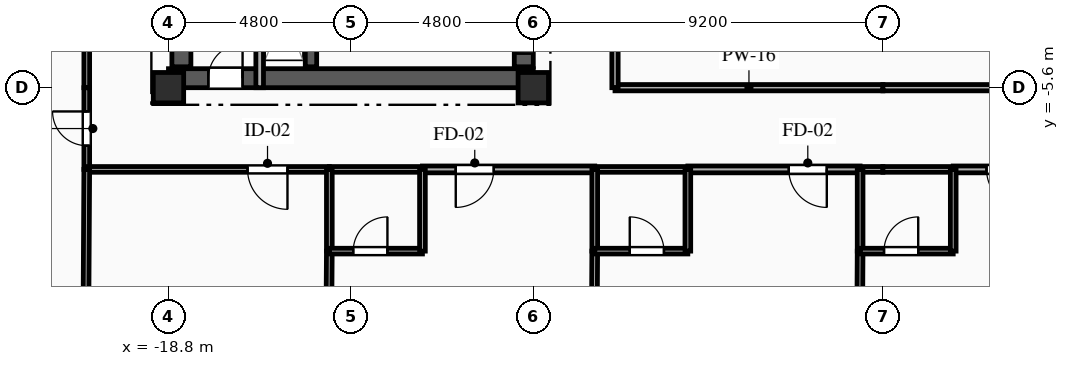
"""IFC4 building model, lengths in metres.
Left out: names, types, materials, properties, quantities, classifications, styles, units other than length and angle.
Written with IfcOpenShell. Run it as: python <this file> out.ifc"""

import sys

from ifc_helpers import new_model, si_unit, direction, frame, frame_2d, origin, origin_2d, place, context, subcontext, project, spatial, rectangle, extrude, element, fill, save


model = new_model("IFC4")
c1 = context("Model", 3, precision=1e-05, world=origin(), true_north=direction((0.0, 1.0)))
c2 = subcontext(c1, "Body", "Model", "MODEL_VIEW")
j1 = project(units=[si_unit("LENGTHUNIT", "METRE"), si_unit("PLANEANGLEUNIT", "RADIAN")], contexts=[c1])
p1 = place(None, origin())
s1 = spatial("IfcSite", under=j1, at=p1, CompositionType="ELEMENT")
p2 = place(p1, origin())
s2 = spatial("IfcBuilding", under=s1, at=p2, CompositionType="ELEMENT")
p3 = place(p2, frame((0.0, 0.0, 206.45)))
s3 = spatial("IfcBuildingStorey", under=s2, at=p3, CompositionType="ELEMENT", Elevation=206.45)
for number, where, z_axis, x_axis in (
    (1, (-18.8, -5.6, 0.0), (0.0, 0.0, 1.0), (1.0, 0.0, 0.0)),
    (2, (-9.2, -5.6, 0.0), (0.0, 0.0, 1.0), (1.0, 0.0, 0.0)),
):
    element("IfcColumn", number, at=place(p3, frame(where, z_axis=z_axis, x_axis=x_axis)), inside=s3, PredefinedType="COLUMN", context=c2, shape_type="SweptSolid", body=[
        extrude(rectangle(XDim=0.8, YDim=0.8, at=origin_2d()), origin(), (0.0, 0.0, 1.0), 3.35),
    ])
p4 = place(p3, frame((-18.8, -5.35, 0.0), z_axis=(0.0, 0.0, 1.0), x_axis=(1.0, 0.0, 0.0)))
e3 = element("IfcWall", 3, at=p4, inside=s3, PredefinedType="SHEAR", context=c2, shape_type="SweptSolid", body=[
    extrude(rectangle(XDim=9.6, YDim=0.5, at=frame_2d((4.8, 0.0))), origin(), (0.0, 0.0, 1.0), 3.04),
])
p5 = place(p4, frame((1.05, 0.0, 0.0)))
e4 = element("IfcOpeningElement", 4, at=p5, cuts=e3, PredefinedType="OPENING", context=c2, shape_type="SweptSolid", body=[
    extrude(rectangle(XDim=0.9, YDim=2.1, at=frame_2d((0.45, 1.05))), frame((0.0, 0.26, 0.0), z_axis=(0.0, -1.0, 0.0), x_axis=(1.0, 0.0, 0.0)), (0.0, 0.0, 1.0), 0.52),
])
p6 = place(p3, frame((-18.46, -5.05, 0.0), z_axis=(0.0, 0.0, 1.0), x_axis=(0.0, 1.0, 0.0)))
e5 = element("IfcWall", 5, at=p6, inside=s3, PredefinedType="SHEAR", context=c2, shape_type="SweptSolid", body=[
    extrude(rectangle(XDim=10.1, YDim=0.5, at=frame_2d((5.05, 0.0))), origin(), (0.0, 0.0, 1.0), 3.04),
])
p7 = place(p3, frame((-9.45, -5.05, 0.0), z_axis=(0.0, 0.0, 1.0), x_axis=(0.0, 1.0, 0.0)))
e6 = element("IfcWall", 6, at=p7, inside=s3, PredefinedType="SHEAR", context=c2, shape_type="SweptSolid", body=[
    extrude(rectangle(XDim=10.1, YDim=0.5, at=frame_2d((5.05, 0.0))), origin(), (0.0, 0.0, 1.0), 3.04),
])
p8 = place(p7, frame((7.175, 0.0, 0.0)))
e7 = element("IfcOpeningElement", 7, at=p8, cuts=e6, PredefinedType="OPENING", context=c2, shape_type="SweptSolid", body=[
    extrude(rectangle(XDim=0.9, YDim=2.1, at=frame_2d((0.45, 1.05))), frame((0.0, 0.26, 0.0), z_axis=(0.0, -1.0, 0.0), x_axis=(1.0, 0.0, 0.0)), (0.0, 0.0, 1.0), 0.52),
])
p9 = place(p7, frame((2.4, 0.0, 0.0)))
e8 = element("IfcOpeningElement", 8, at=p9, cuts=e6, PredefinedType="OPENING", context=c2, shape_type="SweptSolid", body=[
    extrude(rectangle(XDim=1.2, YDim=2.15, at=frame_2d((0.6, 1.075))), frame((0.0, 0.26, 0.0), z_axis=(0.0, -1.0, 0.0), x_axis=(1.0, 0.0, 0.0)), (0.0, 0.0, 1.0), 0.52),
])
p10 = place(p7, frame((0.35, 0.0, 0.0)))
e9 = element("IfcOpeningElement", 9, at=p10, cuts=e6, PredefinedType="OPENING", context=c2, shape_type="SweptSolid", body=[
    extrude(rectangle(XDim=0.9, YDim=2.1, at=frame_2d((0.45, 1.05))), frame((0.0, 0.26, 0.0), z_axis=(0.0, -1.0, 0.0), x_axis=(1.0, 0.0, 0.0)), (0.0, 0.0, 1.0), 0.52),
])
p11 = place(p7, frame((5.0, 0.0, 0.0)))
e10 = element("IfcOpeningElement", 10, at=p11, cuts=e6, PredefinedType="OPENING", context=c2, shape_type="SweptSolid", body=[
    extrude(rectangle(XDim=0.9, YDim=2.1, at=frame_2d((0.45, 1.05))), frame((0.0, 0.26, 0.0), z_axis=(0.0, -1.0, 0.0), x_axis=(1.0, 0.0, 0.0)), (0.0, 0.0, 1.0), 0.52),
])
p12 = place(p3, frame((-15.05, -5.05, 0.0), z_axis=(0.0, 0.0, 1.0), x_axis=(0.0, 1.0, 0.0)))
e11 = element("IfcWall", 11, at=p12, inside=s3, PredefinedType="SHEAR", context=c2, shape_type="SweptSolid", body=[
    extrude(rectangle(XDim=10.1, YDim=0.3, at=frame_2d((5.05, 0.0))), origin(), (0.0, 0.0, 1.0), 3.04),
])
p13 = place(p3, frame((-16.4, -5.6, 0.0), z_axis=(0.0, 0.0, 1.0), x_axis=(0.0, 1.0, 0.0)))
e12 = element("IfcWall", 12, at=p13, inside=s3, PredefinedType="PARTITIONING", context=c2, shape_type="SweptSolid", body=[
    extrude(rectangle(XDim=3.49, YDim=0.2, at=frame_2d((1.745, 0.0))), origin(), (0.0, 0.0, 1.0), 3.04),
])
p14 = place(p3, frame((-20.95, -7.75, 0.0), z_axis=(0.0, 0.0, 1.0), x_axis=(0.0, 1.0, 0.0)))
e13 = element("IfcWall", 13, at=p14, inside=s3, PredefinedType="PARTITIONING", context=c2, shape_type="SweptSolid", body=[
    extrude(rectangle(XDim=2.15, YDim=0.15, at=frame_2d((1.075, 0.0))), origin(), (0.0, 0.0, 1.0), 3.04),
])
p15 = place(p14, frame((0.625, 0.0, 0.0)))
e14 = element("IfcOpeningElement", 14, at=p15, cuts=e13, PredefinedType="OPENING", context=c2, shape_type="SweptSolid", body=[
    extrude(rectangle(XDim=0.9, YDim=2.1, at=frame_2d((0.45, 1.05))), frame((0.0, 0.085, 0.0), z_axis=(0.0, -1.0, 0.0), x_axis=(1.0, 0.0, 0.0)), (0.0, 0.0, 1.0), 0.17),
])
p16 = place(p3, frame((-14.567, -7.75, 0.0), z_axis=(0.0, 0.0, 1.0), x_axis=(-1.0, 0.0, 0.0)))
e15 = element("IfcWall", 15, at=p16, inside=s3, PredefinedType="PARTITIONING", context=c2, shape_type="SweptSolid", body=[
    extrude(rectangle(XDim=6.383, YDim=0.15, at=frame_2d((3.191, 0.0))), origin(), (0.0, 0.0, 1.0), 3.04),
])
p17 = place(p16, frame((1.102, 0.0, 0.0)))
e16 = element("IfcOpeningElement", 16, at=p17, cuts=e15, PredefinedType="OPENING", context=c2, shape_type="SweptSolid", body=[
    extrude(rectangle(XDim=1.05, YDim=2.15, at=frame_2d((0.525, 1.075))), frame((0.0, 0.085, 0.0), z_axis=(0.0, -1.0, 0.0), x_axis=(1.0, 0.0, 0.0)), (0.0, 0.0, 1.0), 0.17),
])
p18 = place(p3, frame((-7.583, -7.75, 0.0), z_axis=(0.0, 0.0, 1.0), x_axis=(-1.0, 0.0, 0.0)))
e17 = element("IfcWall", 17, at=p18, inside=s3, PredefinedType="PARTITIONING", context=c2, shape_type="SweptSolid", body=[
    extrude(rectangle(XDim=4.534, YDim=0.18, at=frame_2d((2.267, 0.0))), origin(), (0.0, 0.0, 1.0), 3.04),
])
p19 = place(p18, frame((2.657, 0.0, 0.0)))
e18 = element("IfcOpeningElement", 18, at=p19, cuts=e17, PredefinedType="OPENING", context=c2, shape_type="SweptSolid", body=[
    extrude(rectangle(XDim=1.0, YDim=2.15, at=frame_2d((0.5, 1.075))), frame((0.0, 0.1, 0.0), z_axis=(0.0, -1.0, 0.0), x_axis=(1.0, 0.0, 0.0)), (0.0, 0.0, 1.0), 0.2),
])
p20 = place(p3, frame((-12.117, -7.75, 0.0), z_axis=(0.0, 0.0, 1.0), x_axis=(-1.0, 0.0, 0.0)))
e19 = element("IfcWall", 19, at=p20, inside=s3, PredefinedType="PLUMBINGWALL", context=c2, shape_type="SweptSolid", body=[
    extrude(rectangle(XDim=2.45, YDim=0.15, at=frame_2d((1.225, 0.0))), origin(), (0.0, 0.0, 1.0), 3.04),
])
p21 = place(p3, frame((-0.6, -7.75, 0.0), z_axis=(0.0, 0.0, 1.0), x_axis=(-1.0, 0.0, 0.0)))
e20 = element("IfcWall", 20, at=p21, inside=s3, PredefinedType="PARTITIONING", context=c2, shape_type="SweptSolid", body=[
    extrude(rectangle(XDim=4.533, YDim=0.18, at=frame_2d((2.267, 0.0))), origin(), (0.0, 0.0, 1.0), 3.04),
])
p22 = place(p21, frame((0.877, 0.0, 0.0)))
e21 = element("IfcOpeningElement", 21, at=p22, cuts=e20, PredefinedType="OPENING", context=c2, shape_type="SweptSolid", body=[
    extrude(rectangle(XDim=1.0, YDim=2.15, at=frame_2d((0.5, 1.075))), frame((0.0, 0.1, 0.0), z_axis=(0.0, -1.0, 0.0), x_axis=(1.0, 0.0, 0.0)), (0.0, 0.0, 1.0), 0.2),
])
p23 = place(p3, frame((-5.133, -7.75, 0.0), z_axis=(0.0, 0.0, 1.0), x_axis=(-1.0, 0.0, 0.0)))
e22 = element("IfcWall", 22, at=p23, inside=s3, PredefinedType="PLUMBINGWALL", context=c2, shape_type="SweptSolid", body=[
    extrude(rectangle(XDim=2.45, YDim=0.15, at=frame_2d((1.225, 0.0))), origin(), (0.0, 0.0, 1.0), 3.04),
])
p24 = place(p3, frame((0.0, -7.75, 0.0), z_axis=(0.0, 0.0, 1.0), x_axis=(-1.0, 0.0, 0.0)))
e23 = element("IfcWall", 23, at=p24, inside=s3, PredefinedType="PLUMBINGWALL", context=c2, shape_type="SweptSolid", body=[
    extrude(rectangle(XDim=0.6, YDim=0.15, at=frame_2d((0.3, 0.0))), origin(), (0.0, 0.0, 1.0), 3.04),
])
p25 = place(p3, frame((-7.05, -5.6, 0.0), z_axis=(0.0, 0.0, 1.0), x_axis=(1.0, 0.0, 0.0)))
e24 = element("IfcWall", 24, at=p25, inside=s3, PredefinedType="PARTITIONING", context=c2, shape_type="SweptSolid", body=[
    extrude(rectangle(XDim=7.05, YDim=0.165, at=frame_2d((3.525, 0.0))), origin(), (0.0, 0.0, 1.0), 2.525),
])
p26 = place(p3, frame((6.383, -7.75, 0.0), z_axis=(0.0, 0.0, 1.0), x_axis=(-1.0, 0.0, 0.0)))
e25 = element("IfcWall", 25, at=p26, inside=s3, PredefinedType="PARTITIONING", context=c2, shape_type="SweptSolid", body=[
    extrude(rectangle(XDim=4.533, YDim=0.18, at=frame_2d((2.267, 0.0))), origin(), (0.0, 0.0, 1.0), 3.04),
])
p27 = place(p26, frame((2.656, 0.0, 0.0)))
e26 = element("IfcOpeningElement", 26, at=p27, cuts=e25, PredefinedType="OPENING", context=c2, shape_type="SweptSolid", body=[
    extrude(rectangle(XDim=1.0, YDim=2.15, at=frame_2d((0.5, 1.075))), frame((0.0, 0.1, 0.0), z_axis=(0.0, -1.0, 0.0), x_axis=(1.0, 0.0, 0.0)), (0.0, 0.0, 1.0), 0.2),
])
p28 = place(p3, frame((1.85, -7.75, 0.0), z_axis=(0.0, 0.0, 1.0), x_axis=(-1.0, 0.0, 0.0)))
e27 = element("IfcWall", 27, at=p28, inside=s3, PredefinedType="PLUMBINGWALL", context=c2, shape_type="SweptSolid", body=[
    extrude(rectangle(XDim=1.85, YDim=0.15, at=frame_2d((0.925, 0.0))), origin(), (0.0, 0.0, 1.0), 3.04),
])
p29 = place(p3, frame((0.0, -5.6, 0.0), z_axis=(0.0, 0.0, 1.0), x_axis=(1.0, 0.0, 0.0)))
e28 = element("IfcWall", 28, at=p29, inside=s3, PredefinedType="PARTITIONING", context=c2, shape_type="SweptSolid", body=[
    extrude(rectangle(XDim=7.05, YDim=0.165, at=frame_2d((3.525, 0.0))), origin(), (0.0, 0.0, 1.0), 2.525),
])
p30 = place(p3, frame((-20.95, -5.6, 0.0), z_axis=(0.0, 0.0, 1.0), x_axis=(0.0, 1.0, 0.0)))
e29 = element("IfcWall", 29, at=p30, inside=s3, PredefinedType="PARTITIONING", context=c2, shape_type="SweptSolid", body=[
    extrude(rectangle(XDim=2.144, YDim=0.15, at=frame_2d((1.072, 0.0))), origin(), (0.0, 0.0, 1.0), 3.04),
])
p31 = place(p3, frame((-7.05, -2.95, 0.0), z_axis=(0.0, 0.0, 1.0), x_axis=(0.0, -1.0, 0.0)))
e30 = element("IfcWall", 30, at=p31, inside=s3, PredefinedType="PARTITIONING", context=c2, shape_type="SweptSolid", body=[
    extrude(rectangle(XDim=2.65, YDim=0.165, at=frame_2d((1.325, 0.0))), origin(), (0.0, 0.0, 1.0), 3.04),
])
p32 = place(p3, frame((-20.95, -7.75, 0.0), z_axis=(0.0, 0.0, 1.0), x_axis=(-0.005804668564, -0.99998315277, 0.0)))
e31 = element("IfcWall", 31, at=p32, inside=s3, PredefinedType="PARTITIONING", context=c2, shape_type="SweptSolid", body=[
    extrude(rectangle(XDim=7.571, YDim=0.15, at=frame_2d((3.785, 0.0))), origin(), (0.0, 0.0, 1.0), 3.04),
])
p33 = place(p3, frame((-14.567, -9.9, 0.0), z_axis=(0.0, 0.0, 1.0), x_axis=(-0.007213951996, -0.99997397911, 0.0)))
e32 = element("IfcWall", 32, at=p33, inside=s3, PredefinedType="PARTITIONING", context=c2, shape_type="SweptSolid", body=[
    extrude(rectangle(XDim=6.092, YDim=0.15, at=frame_2d((3.046, 0.0))), origin(), (0.0, 0.0, 1.0), 3.04),
])
p34 = place(p3, frame((-14.567, -7.75, 0.0), z_axis=(0.0, 0.0, 1.0), x_axis=(0.0, -1.0, 0.0)))
e33 = element("IfcWall", 33, at=p34, inside=s3, PredefinedType="PLUMBINGWALL", context=c2, shape_type="SweptSolid", body=[
    extrude(rectangle(XDim=2.15, YDim=0.15, at=frame_2d((1.075, 0.0))), origin(), (0.0, 0.0, 1.0), 3.04),
])
p35 = place(p3, frame((-14.567, -9.9, 0.0), z_axis=(0.0, 0.0, 1.0), x_axis=(1.0, 0.0, 0.0)))
e34 = element("IfcWall", 34, at=p35, inside=s3, PredefinedType="PLUMBINGWALL", context=c2, shape_type="SweptSolid", body=[
    extrude(rectangle(XDim=2.45, YDim=0.15, at=frame_2d((1.225, 0.0))), origin(), (0.0, 0.0, 1.0), 3.04),
])
p36 = place(p35, frame((0.629, 0.0, 0.0)))
e35 = element("IfcOpeningElement", 35, at=p36, cuts=e34, PredefinedType="OPENING", context=c2, shape_type="SweptSolid", body=[
    extrude(rectangle(XDim=0.9, YDim=2.1, at=frame_2d((0.45, 1.05))), frame((0.0, 0.085, 0.0), z_axis=(0.0, -1.0, 0.0), x_axis=(1.0, 0.0, 0.0)), (0.0, 0.0, 1.0), 0.17),
])
p37 = place(p3, frame((-12.117, -9.9, 0.0), z_axis=(0.0, 0.0, 1.0), x_axis=(0.0, 1.0, 0.0)))
e36 = element("IfcWall", 36, at=p37, inside=s3, PredefinedType="PLUMBINGWALL", context=c2, shape_type="SweptSolid", body=[
    extrude(rectangle(XDim=2.15, YDim=0.15, at=frame_2d((1.075, 0.0))), origin(), (0.0, 0.0, 1.0), 3.04),
])
p38 = place(p3, frame((-7.583, -9.9, 0.0), z_axis=(0.0, 0.0, 1.0), x_axis=(-0.006438095341, -0.999979275249, 0.0)))
e37 = element("IfcWall", 37, at=p38, inside=s3, PredefinedType="PARTITIONING", context=c2, shape_type="SweptSolid", body=[
    extrude(rectangle(XDim=6.826, YDim=0.15, at=frame_2d((3.413, 0.0))), origin(), (0.0, 0.0, 1.0), 3.04),
])
p39 = place(p3, frame((-7.583, -7.75, 0.0), z_axis=(0.0, 0.0, 1.0), x_axis=(0.0, -1.0, 0.0)))
e38 = element("IfcWall", 38, at=p39, inside=s3, PredefinedType="PLUMBINGWALL", context=c2, shape_type="SweptSolid", body=[
    extrude(rectangle(XDim=2.15, YDim=0.15, at=frame_2d((1.075, 0.0))), origin(), (0.0, 0.0, 1.0), 3.04),
])
p40 = place(p3, frame((-7.583, -9.9, 0.0), z_axis=(0.0, 0.0, 1.0), x_axis=(1.0, 0.0, 0.0)))
e39 = element("IfcWall", 39, at=p40, inside=s3, PredefinedType="PLUMBINGWALL", context=c2, shape_type="SweptSolid", body=[
    extrude(rectangle(XDim=2.45, YDim=0.15, at=frame_2d((1.225, 0.0))), origin(), (0.0, 0.0, 1.0), 3.04),
])
p41 = place(p40, frame((0.921, 0.0, 0.0)))
e40 = element("IfcOpeningElement", 40, at=p41, cuts=e39, PredefinedType="OPENING", context=c2, shape_type="SweptSolid", body=[
    extrude(rectangle(XDim=0.9, YDim=2.1, at=frame_2d((0.45, 1.05))), frame((0.0, 0.085, 0.0), z_axis=(0.0, -1.0, 0.0), x_axis=(1.0, 0.0, 0.0)), (0.0, 0.0, 1.0), 0.17),
])
p42 = place(p3, frame((-5.133, -9.9, 0.0), z_axis=(0.0, 0.0, 1.0), x_axis=(0.0, 1.0, 0.0)))
e41 = element("IfcWall", 41, at=p42, inside=s3, PredefinedType="PLUMBINGWALL", context=c2, shape_type="SweptSolid", body=[
    extrude(rectangle(XDim=2.15, YDim=0.15, at=frame_2d((1.075, 0.0))), origin(), (0.0, 0.0, 1.0), 3.04),
])
p43 = place(p3, frame((-0.6, -9.9, 0.0), z_axis=(0.0, 0.0, 1.0), x_axis=(-0.005780810266, -0.999983290977, 0.0)))
e42 = element("IfcWall", 42, at=p43, inside=s3, PredefinedType="PARTITIONING", context=c2, shape_type="SweptSolid", body=[
    extrude(rectangle(XDim=7.56, YDim=0.15, at=frame_2d((3.78, 0.0))), origin(), (0.0, 0.0, 1.0), 3.04),
])
p44 = place(p3, frame((-0.6, -7.75, 0.0), z_axis=(0.0, 0.0, 1.0), x_axis=(0.0, -1.0, 0.0)))
e43 = element("IfcWall", 43, at=p44, inside=s3, PredefinedType="PLUMBINGWALL", context=c2, shape_type="SweptSolid", body=[
    extrude(rectangle(XDim=2.15, YDim=0.15, at=frame_2d((1.075, 0.0))), origin(), (0.0, 0.0, 1.0), 3.04),
])
p45 = place(p3, frame((-0.6, -9.9, 0.0), z_axis=(0.0, 0.0, 1.0), x_axis=(1.0, 0.0, 0.0)))
e44 = element("IfcWall", 44, at=p45, inside=s3, PredefinedType="PLUMBINGWALL", context=c2, shape_type="SweptSolid", body=[
    extrude(rectangle(XDim=2.45, YDim=0.15, at=frame_2d((1.225, 0.0))), origin(), (0.0, 0.0, 1.0), 3.04),
])
p46 = place(p45, frame((0.629, 0.0, 0.0)))
e45 = element("IfcOpeningElement", 45, at=p46, cuts=e44, PredefinedType="OPENING", context=c2, shape_type="SweptSolid", body=[
    extrude(rectangle(XDim=0.9, YDim=2.1, at=frame_2d((0.45, 1.05))), frame((0.0, 0.085, 0.0), z_axis=(0.0, -1.0, 0.0), x_axis=(1.0, 0.0, 0.0)), (0.0, 0.0, 1.0), 0.17),
])
p47 = place(p3, frame((1.85, -9.9, 0.0), z_axis=(0.0, 0.0, 1.0), x_axis=(0.0, 1.0, 0.0)))
e46 = element("IfcWall", 46, at=p47, inside=s3, PredefinedType="PLUMBINGWALL", context=c2, shape_type="SweptSolid", body=[
    extrude(rectangle(XDim=2.15, YDim=0.15, at=frame_2d((1.075, 0.0))), origin(), (0.0, 0.0, 1.0), 3.04),
])
p48 = place(p5, origin())
e47 = element("IfcDoor", 47, at=p48, inside=s3, OperationType="SINGLE_SWING_RIGHT", PredefinedType="DOOR", context=c2, shape_type="SweptSolid", body=[
    extrude(rectangle(XDim=0.9, YDim=2.1, at=frame_2d((0.45, 1.05))), frame((0.0, 0.025, 0.0), z_axis=(0.0, -1.0, 0.0), x_axis=(1.0, 0.0, 0.0)), (0.0, 0.0, 1.0), 0.05),
])
fill(e4, e47)
p49 = place(p10, origin())
e48 = element("IfcDoor", 48, at=p49, inside=s3, OperationType="SINGLE_SWING_RIGHT", PredefinedType="DOOR", context=c2, shape_type="SweptSolid", body=[
    extrude(rectangle(XDim=0.9, YDim=2.1, at=frame_2d((0.45, 1.05))), frame((0.0, 0.025, 0.0), z_axis=(0.0, -1.0, 0.0), x_axis=(1.0, 0.0, 0.0)), (0.0, 0.0, 1.0), 0.05),
])
fill(e9, e48)
p50 = place(p15, origin())
e49 = element("IfcDoor", 49, at=p50, inside=s3, OperationType="SINGLE_SWING_RIGHT", PredefinedType="DOOR", context=c2, shape_type="SweptSolid", body=[
    extrude(rectangle(XDim=0.9, YDim=2.1, at=frame_2d((0.45, 1.05))), frame((0.0, 0.025, 0.0), z_axis=(0.0, -1.0, 0.0), x_axis=(1.0, 0.0, 0.0)), (0.0, 0.0, 1.0), 0.05),
])
fill(e14, e49)
p51 = place(p17, origin())
e50 = element("IfcDoor", 50, at=p51, inside=s3, OperationType="SINGLE_SWING_LEFT", PredefinedType="DOOR", context=c2, shape_type="SweptSolid", body=[
    extrude(rectangle(XDim=1.05, YDim=2.15, at=frame_2d((0.525, 1.075))), frame((0.0, 0.025, 0.0), z_axis=(0.0, -1.0, 0.0), x_axis=(1.0, 0.0, 0.0)), (0.0, 0.0, 1.0), 0.05),
])
fill(e16, e50)
p52 = place(p19, origin())
e51 = element("IfcDoor", 51, at=p52, inside=s3, OperationType="SINGLE_SWING_RIGHT", PredefinedType="DOOR", context=c2, shape_type="SweptSolid", body=[
    extrude(rectangle(XDim=1.0, YDim=2.15, at=frame_2d((0.5, 1.075))), frame((0.0, 0.025, 0.0), z_axis=(0.0, -1.0, 0.0), x_axis=(1.0, 0.0, 0.0)), (0.0, 0.0, 1.0), 0.05),
])
fill(e18, e51)
p53 = place(p22, origin())
e52 = element("IfcDoor", 52, at=p53, inside=s3, OperationType="SINGLE_SWING_LEFT", PredefinedType="DOOR", context=c2, shape_type="SweptSolid", body=[
    extrude(rectangle(XDim=1.0, YDim=2.15, at=frame_2d((0.5, 1.075))), frame((0.0, 0.025, 0.0), z_axis=(0.0, -1.0, 0.0), x_axis=(1.0, 0.0, 0.0)), (0.0, 0.0, 1.0), 0.05),
])
fill(e21, e52)
p54 = place(p27, origin())
e53 = element("IfcDoor", 53, at=p54, inside=s3, OperationType="SINGLE_SWING_LEFT", PredefinedType="DOOR", context=c2, shape_type="SweptSolid", body=[
    extrude(rectangle(XDim=1.0, YDim=2.15, at=frame_2d((0.5, 1.075))), frame((0.0, 0.025, 0.0), z_axis=(0.0, -1.0, 0.0), x_axis=(1.0, 0.0, 0.0)), (0.0, 0.0, 1.0), 0.05),
])
fill(e26, e53)
p55 = place(p36, origin())
e54 = element("IfcDoor", 54, at=p55, inside=s3, OperationType="SINGLE_SWING_RIGHT", PredefinedType="DOOR", context=c2, shape_type="SweptSolid", body=[
    extrude(rectangle(XDim=0.9, YDim=2.1, at=frame_2d((0.45, 1.05))), frame((0.0, 0.025, 0.0), z_axis=(0.0, -1.0, 0.0), x_axis=(1.0, 0.0, 0.0)), (0.0, 0.0, 1.0), 0.05),
])
fill(e35, e54)
p56 = place(p41, origin())
e55 = element("IfcDoor", 55, at=p56, inside=s3, OperationType="SINGLE_SWING_LEFT", PredefinedType="DOOR", context=c2, shape_type="SweptSolid", body=[
    extrude(rectangle(XDim=0.9, YDim=2.1, at=frame_2d((0.45, 1.05))), frame((0.0, 0.025, 0.0), z_axis=(0.0, -1.0, 0.0), x_axis=(1.0, 0.0, 0.0)), (0.0, 0.0, 1.0), 0.05),
])
fill(e40, e55)
p57 = place(p46, origin())
e56 = element("IfcDoor", 56, at=p57, inside=s3, OperationType="SINGLE_SWING_RIGHT", PredefinedType="DOOR", context=c2, shape_type="SweptSolid", body=[
    extrude(rectangle(XDim=0.9, YDim=2.1, at=frame_2d((0.45, 1.05))), frame((0.0, 0.025, 0.0), z_axis=(0.0, -1.0, 0.0), x_axis=(1.0, 0.0, 0.0)), (0.0, 0.0, 1.0), 0.05),
])
fill(e45, e56)
save(model, sys.argv[1])
